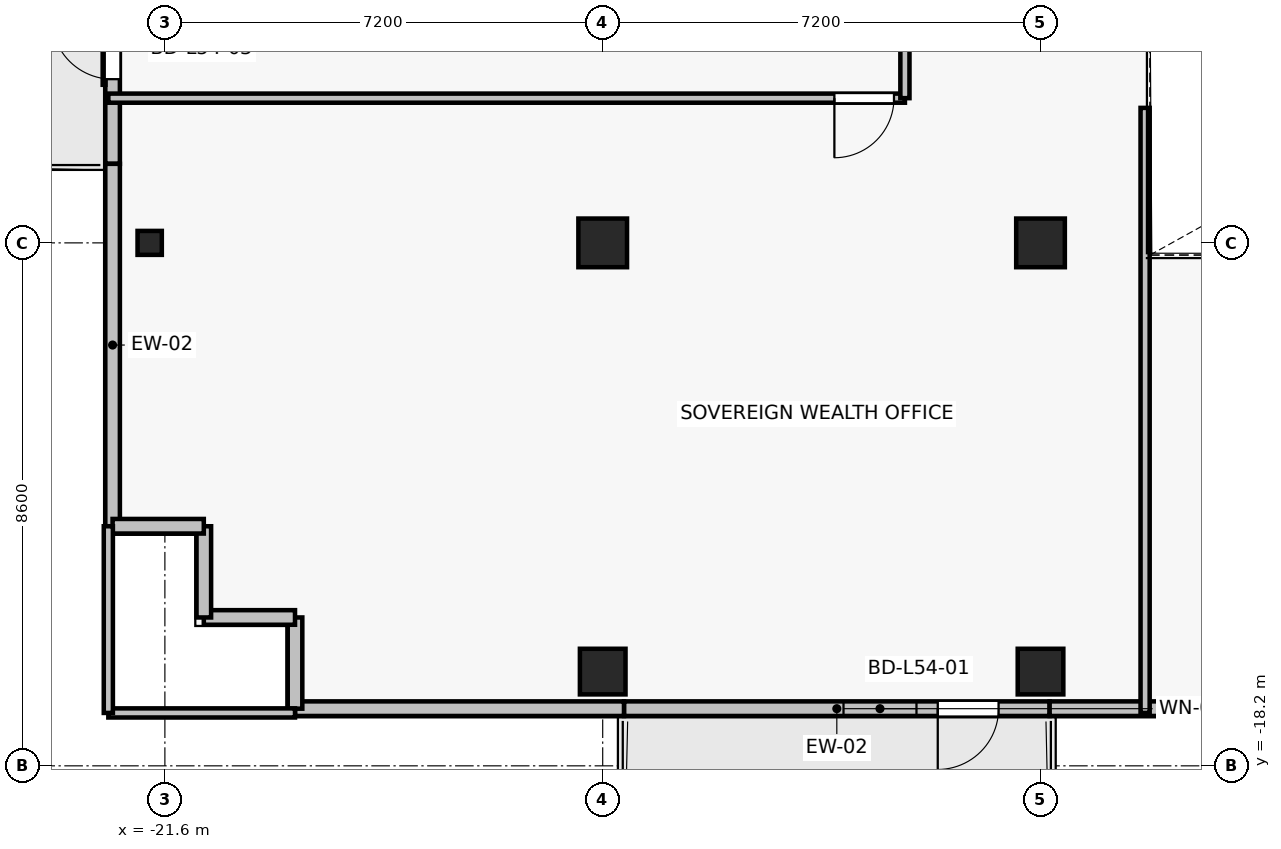
"""IFC4 building model, lengths in metres.
Left out: names, types, materials, properties, quantities, classifications, styles, units other than length and angle.
Written with IfcOpenShell. Run it as: python <this file> out.ifc"""

import sys

from ifc_helpers import new_model, si_unit, direction, frame, frame_2d, origin, origin_2d, place, context, subcontext, project, spatial, rectangle, i_section, extrude, source, transform, mapped, element, fill, save


model = new_model("IFC4")
c1 = context("Model", 3, precision=1e-05, world=origin(), true_north=direction((0.0, 1.0)))
c2 = subcontext(c1, "Body", "Model", "MODEL_VIEW")
j1 = project(units=[si_unit("LENGTHUNIT", "METRE"), si_unit("PLANEANGLEUNIT", "RADIAN")], contexts=[c1])
p1 = place(None, origin())
s1 = spatial("IfcSite", under=j1, at=p1, CompositionType="ELEMENT")
p2 = place(p1, origin())
s2 = spatial("IfcBuilding", under=s1, at=p2, CompositionType="ELEMENT")
p3 = place(p2, frame((0.0, 0.0, 192.4)))
s3 = spatial("IfcBuildingStorey", under=s2, at=p3, CompositionType="ELEMENT", Elevation=192.4)
for number, where, z_axis, x_axis in (
    (1, (-14.4, -9.6, 0.0), (0.0, 0.0, 1.0), (1.0, 0.0, 0.0)),
    (2, (-7.2, -9.6, 0.0), (0.0, 0.0, 1.0), (1.0, 0.0, 0.0)),
):
    element("IfcColumn", number, at=place(p3, frame(where, z_axis=z_axis, x_axis=x_axis)), inside=s3, PredefinedType="COLUMN", context=c2, shape_type="SweptSolid", body=[
        extrude(rectangle(XDim=0.8, YDim=0.8, at=origin_2d()), origin(), (0.0, 0.0, 1.0), 3.3),
    ])
for number, where, z_axis, x_axis in (
    (3, (-14.4, -16.65, 0.0), (0.0, 0.0, 1.0), (1.0, 0.0, 0.0)),
    (4, (-7.2, -16.65, 0.0), (0.0, 0.0, 1.0), (1.0, 0.0, 0.0)),
):
    element("IfcColumn", number, at=place(p3, frame(where, z_axis=z_axis, x_axis=x_axis)), inside=s3, PredefinedType="COLUMN", context=c2, shape_type="SweptSolid", body=[
        extrude(rectangle(XDim=0.75, YDim=0.75, at=origin_2d()), origin(), (0.0, 0.0, 1.0), 3.3),
    ])
p4 = place(p3, frame((-21.85, -9.6, 0.0), z_axis=(0.0, 0.0, 1.0), x_axis=(1.0, 0.0, 0.0)))
e5 = element("IfcColumn", 5, at=p4, inside=s3, PredefinedType="COLUMN", context=c2, shape_type="SweptSolid", body=[
    extrude(i_section(OverallWidth=0.399, OverallDepth=0.394, WebThickness=0.023, FlangeThickness=0.037, FilletRadius=0.015, at=origin_2d()), origin(), (0.0, 0.0, 1.0), 3.3),
])
p5 = place(p3, frame((-7.05, -17.26, 0.0), z_axis=(0.0, 0.0, 1.0), x_axis=(-1.0, 0.0, 0.0)))
e6 = element("IfcWall", 6, at=p5, inside=s3, PredefinedType="SOLIDWALL", context=c2, shape_type="SweptSolid", body=[
    extrude(rectangle(XDim=7.0, YDim=0.24, at=frame_2d((3.5, 0.0))), origin(), (0.0, 0.0, 1.0), 2.665),
])
p6 = place(p5, frame((0.84, 0.0, 0.0)))
e7 = element("IfcOpeningElement", 7, at=p6, cuts=e6, PredefinedType="OPENING", context=c2, shape_type="SweptSolid", body=[
    extrude(rectangle(XDim=1.0, YDim=2.2, at=frame_2d((0.5, 1.1))), frame((0.0, 0.13, 0.0), z_axis=(0.0, -1.0, 0.0), x_axis=(1.0, 0.0, 0.0)), (0.0, 0.0, 1.0), 0.26),
])
p7 = place(p5, frame((2.19, 0.0, 0.85)))
e8 = element("IfcOpeningElement", 8, at=p7, cuts=e6, PredefinedType="OPENING", context=c2, shape_type="SweptSolid", body=[
    extrude(rectangle(XDim=1.2, YDim=1.5, at=frame_2d((0.6, 0.75))), frame((0.0, 0.13, 0.0), z_axis=(0.0, -1.0, 0.0), x_axis=(1.0, 0.0, 0.0)), (0.0, 0.0, 1.0), 0.26),
])
p8 = place(p3, frame((-22.46, -8.3, 0.0), z_axis=(0.0, 0.0, 1.0), x_axis=(0.0, 1.0, 0.0)))
e9 = element("IfcWall", 9, at=p8, inside=s3, PredefinedType="SOLIDWALL", context=c2, shape_type="SweptSolid", body=[
    extrude(rectangle(XDim=5.8, YDim=0.24, at=frame_2d((2.9, 0.0))), origin(), (0.0, 0.0, 1.0), 3.075),
])
p9 = place(p8, frame((1.392, 0.0, 0.0)))
e10 = element("IfcOpeningElement", 10, at=p9, cuts=e9, PredefinedType="OPENING", context=c2, shape_type="SweptSolid", body=[
    extrude(rectangle(XDim=1.0, YDim=2.2, at=frame_2d((0.5, 1.1))), frame((0.0, 0.13, 0.0), z_axis=(0.0, -1.0, 0.0), x_axis=(1.0, 0.0, 0.0)), (0.0, 0.0, 1.0), 0.26),
])
p10 = place(p8, frame((2.7, 0.0, 0.85)))
e11 = element("IfcOpeningElement", 11, at=p10, cuts=e9, PredefinedType="OPENING", context=c2, shape_type="SweptSolid", body=[
    extrude(rectangle(XDim=1.5, YDim=1.6, at=frame_2d((0.75, 0.8))), frame((0.0, 0.13, 0.0), z_axis=(0.0, -1.0, 0.0), x_axis=(1.0, 0.0, 0.0)), (0.0, 0.0, 1.0), 0.26),
])
p11 = place(p3, frame((-22.46, -8.3, 0.0), z_axis=(0.0, 0.0, 1.0), x_axis=(0.0, -1.0, 0.0)))
e12 = element("IfcWall", 12, at=p11, inside=s3, PredefinedType="SOLIDWALL", context=c2, shape_type="SweptSolid", body=[
    extrude(rectangle(XDim=5.96, YDim=0.24, at=frame_2d((2.98, 0.0))), origin(), (0.0, 0.0, 1.0), 3.075),
])
p12 = place(p3, frame((-7.05, -17.26, 0.0), z_axis=(0.0, 0.0, 1.0), x_axis=(1.0, 0.0, 0.0)))
e13 = element("IfcWall", 13, at=p12, inside=s3, PredefinedType="SOLIDWALL", context=c2, shape_type="SweptSolid", body=[
    extrude(rectangle(XDim=3.85, YDim=0.24, at=frame_2d((1.925, 0.0))), origin(), (0.0, 0.0, 1.0), 3.075),
])
p13 = place(p3, frame((-19.46, -17.26, 0.0), z_axis=(0.0, 0.0, 1.0), x_axis=(1.0, 0.0, 0.0)))
e14 = element("IfcWall", 14, at=p13, inside=s3, PredefinedType="SOLIDWALL", context=c2, shape_type="SweptSolid", body=[
    extrude(rectangle(XDim=5.41, YDim=0.24, at=frame_2d((2.705, 0.0))), origin(), (0.0, 0.0, 1.0), 3.075),
])
for number, where, z_axis, x_axis in (
    (15, (-19.46, -15.76, 0.0), (0.0, 0.0, 1.0), (0.0, -1.0, 0.0)),
    (16, (-20.96, -15.76, 0.0), (0.0, 0.0, 1.0), (1.0, 0.0, 0.0)),
    (17, (-20.96, -14.26, 0.0), (0.0, 0.0, 1.0), (0.0, -1.0, 0.0)),
    (18, (-22.46, -14.26, 0.0), (0.0, 0.0, 1.0), (1.0, 0.0, 0.0)),
):
    element("IfcWall", number, at=place(p3, frame(where, z_axis=z_axis, x_axis=x_axis)), inside=s3, PredefinedType="SOLIDWALL", context=c2, shape_type="SweptSolid", body=[
        extrude(rectangle(XDim=1.5, YDim=0.24, at=frame_2d((0.75, 0.0))), origin(), (0.0, 0.0, 1.0), 3.075),
    ])
p14 = place(p3, frame((-9.43, -7.22, 0.0), z_axis=(0.0, 0.0, 1.0), x_axis=(-1.0, 0.0, 0.0)))
e19 = element("IfcWall", 19, at=p14, inside=s3, PredefinedType="PARTITIONING", context=c2, shape_type="SweptSolid", body=[
    extrude(rectangle(XDim=13.1, YDim=0.15, at=frame_2d((6.55, 0.0))), origin(), (0.0, 0.0, 1.0), 2.565),
])
p15 = place(p14, frame((0.18, 0.0, 0.0)))
e20 = element("IfcOpeningElement", 20, at=p15, cuts=e19, PredefinedType="OPENING", context=c2, shape_type="SweptSolid", body=[
    extrude(rectangle(XDim=0.98, YDim=2.15, at=frame_2d((0.49, 1.075))), frame((0.0, 0.085, 0.0), z_axis=(0.0, -1.0, 0.0), x_axis=(1.0, 0.0, 0.0)), (0.0, 0.0, 1.0), 0.17),
])
p16 = place(p3, frame((-9.43, -3.83, 0.0), z_axis=(0.0, 0.0, 1.0), x_axis=(0.0, -1.0, 0.0)))
e21 = element("IfcWall", 21, at=p16, inside=s3, PredefinedType="PARTITIONING", context=c2, shape_type="SweptSolid", body=[
    extrude(rectangle(XDim=3.39, YDim=0.15, at=frame_2d((1.695, 0.0))), origin(), (0.0, 0.0, 1.0), 2.665),
])
p17 = place(p3, frame((-19.46, -17.33, 0.0), z_axis=(0.0, 0.0, 1.0), x_axis=(-1.0, 0.0, 0.0)))
e22 = element("IfcWall", 22, at=p17, inside=s3, PredefinedType="PARTITIONING", context=c2, shape_type="SweptSolid", body=[
    extrude(rectangle(XDim=3.07, YDim=0.15, at=frame_2d((1.535, 0.0))), origin(), (0.0, 0.0, 1.0), 2.665),
])
p18 = place(p3, frame((-22.53, -17.33, 0.0), z_axis=(0.0, 0.0, 1.0), x_axis=(0.0, 1.0, 0.0)))
e23 = element("IfcWall", 23, at=p18, inside=s3, PredefinedType="PARTITIONING", context=c2, shape_type="SweptSolid", body=[
    extrude(rectangle(XDim=3.07, YDim=0.15, at=frame_2d((1.535, 0.0))), origin(), (0.0, 0.0, 1.0), 3.075),
])
p19 = place(p3, frame((-5.48, -7.38, 0.0), z_axis=(0.0, 0.0, 1.0), x_axis=(0.0, -1.0, 0.0)))
e24 = element("IfcWall", 24, at=p19, inside=s3, PredefinedType="PARTITIONING", context=c2, shape_type="SweptSolid", body=[
    extrude(rectangle(XDim=9.95, YDim=0.15, at=frame_2d((4.975, 0.0))), origin(), (0.0, 0.0, 1.0), 2.565),
])
m1 = source(origin(), c2, "Body", "SweptSolid", [
    extrude(rectangle(XDim=1.0, YDim=2.2, at=frame_2d((0.5, 1.1))), frame((0.0, 0.025, 0.0), z_axis=(0.0, -1.0, 0.0), x_axis=(1.0, 0.0, 0.0)), (0.0, 0.0, 1.0), 0.05),
])
p20 = place(p6, origin())
e25 = element("IfcDoor", 25, at=p20, inside=s3, OperationType="SINGLE_SWING_RIGHT", PredefinedType="DOOR", context=c2, shape_type="MappedRepresentation", body=[
    mapped(m1, transform((0.0, 0.0, 0.0), x_axis=(1.0, 0.0, 0.0), y_axis=(0.0, 1.0, 0.0), z_axis=(0.0, 0.0, 1.0), scale=1.0)),
])
fill(e7, e25)
m2 = source(origin(), c2, "Body", "SweptSolid", [
    extrude(rectangle(XDim=1.2, YDim=1.5, at=frame_2d((0.6, 0.75))), frame((0.0, 0.03, 0.0), z_axis=(0.0, -1.0, 0.0), x_axis=(1.0, 0.0, 0.0)), (0.0, 0.0, 1.0), 0.06),
])
p21 = place(p7, origin())
e26 = element("IfcWindow", 26, at=p21, inside=s3, PartitioningType="SINGLE_PANEL", PredefinedType="WINDOW", context=c2, shape_type="MappedRepresentation", body=[
    mapped(m2, transform((0.0, 0.0, 0.0), x_axis=(1.0, 0.0, 0.0), y_axis=(0.0, 1.0, 0.0), z_axis=(0.0, 0.0, 1.0), scale=1.0)),
])
fill(e8, e26)
p22 = place(p9, origin())
e27 = element("IfcDoor", 27, at=p22, inside=s3, OperationType="SINGLE_SWING_RIGHT", PredefinedType="DOOR", context=c2, shape_type="MappedRepresentation", body=[
    mapped(m1, transform((0.0, 0.0, 0.0), x_axis=(1.0, 0.0, 0.0), y_axis=(0.0, 1.0, 0.0), z_axis=(0.0, 0.0, 1.0), scale=1.0)),
])
fill(e10, e27)
m3 = source(origin(), c2, "Body", "SweptSolid", [
    extrude(rectangle(XDim=0.98, YDim=2.15, at=frame_2d((0.49, 1.075))), frame((0.0, 0.025, 0.0), z_axis=(0.0, -1.0, 0.0), x_axis=(1.0, 0.0, 0.0)), (0.0, 0.0, 1.0), 0.05),
])
p23 = place(p15, origin())
e28 = element("IfcDoor", 28, at=p23, inside=s3, OperationType="SINGLE_SWING_RIGHT", PredefinedType="DOOR", context=c2, shape_type="MappedRepresentation", body=[
    mapped(m3, transform((0.0, 0.0, 0.0), x_axis=(1.0, 0.0, 0.0), y_axis=(0.0, 1.0, 0.0), z_axis=(0.0, 0.0, 1.0), scale=1.0)),
])
fill(e20, e28)
save(model, sys.argv[1])
